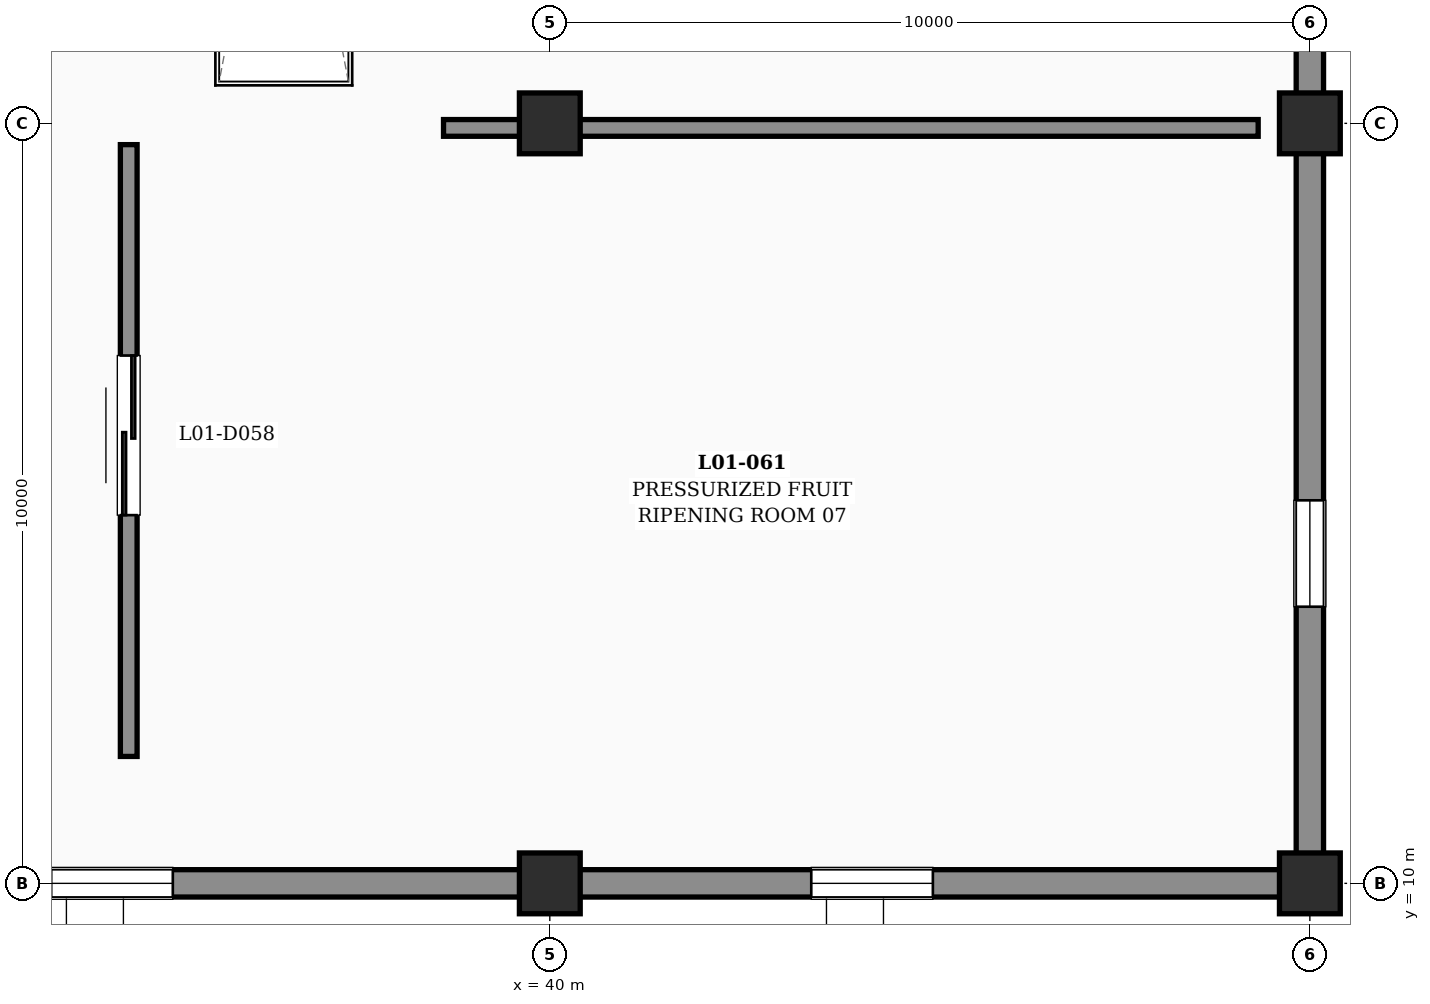
"""IFC4 building model, lengths in metres.
Left out: names, types, materials, properties, quantities, classifications, styles, units other than length and angle.
Written with IfcOpenShell. Run it as: python <this file> out.ifc"""

import sys

from ifc_helpers import new_model, si_unit, direction, frame, frame_2d, origin, origin_2d, place, context, subcontext, project, spatial, rectangle, extrude, element, fill, save


model = new_model("IFC4")
c1 = context("Model", 3, precision=1e-05, world=origin(), true_north=direction((0.0, 1.0)))
c2 = subcontext(c1, "Body", "Model", "MODEL_VIEW")
j1 = project(units=[si_unit("LENGTHUNIT", "METRE"), si_unit("PLANEANGLEUNIT", "RADIAN")], contexts=[c1])
p1 = place(None, origin())
s1 = spatial("IfcSite", under=j1, at=p1, CompositionType="ELEMENT")
p2 = place(p1, origin())
s2 = spatial("IfcBuilding", under=s1, at=p2, CompositionType="ELEMENT")
p3 = place(p2, frame((0.0, 0.0, 6.0)))
s3 = spatial("IfcBuildingStorey", under=s2, at=p3, CompositionType="ELEMENT", Elevation=6.0)
for number, where, z_axis, x_axis in (
    (1, (40.0, 10.0, 0.0), (0.0, 0.0, 1.0), (1.0, 0.0, 0.0)),
    (2, (40.0, 20.0, 0.0), (0.0, 0.0, 1.0), (1.0, 0.0, 0.0)),
    (3, (50.0, 10.0, 0.0), (0.0, 0.0, 1.0), (1.0, 0.0, 0.0)),
    (4, (50.0, 20.0, 0.0), (0.0, 0.0, 1.0), (1.0, 0.0, 0.0)),
):
    element("IfcColumn", number, at=place(p3, frame(where, z_axis=z_axis, x_axis=x_axis)), inside=s3, PredefinedType="COLUMN", context=c2, shape_type="SweptSolid", body=[
        extrude(rectangle(XDim=0.8, YDim=0.8, at=origin_2d()), origin(), (0.0, 0.0, 1.0), 4.8),
    ])
p4 = place(p3, frame((50.0, 10.24, 0.0), z_axis=(0.0, 0.0, 1.0), x_axis=(0.0, 1.0, 0.0)))
e5 = element("IfcWall", 5, at=p4, inside=s3, PredefinedType="SOLIDWALL", context=c2, shape_type="SweptSolid", body=[
    extrude(rectangle(XDim=9.52, YDim=0.36, at=frame_2d((4.76, 0.0))), origin(), (0.0, 0.0, 1.0), 3.61),
])
p5 = place(p4, frame((3.4, 0.0, 1.2)))
e6 = element("IfcOpeningElement", 6, at=p5, cuts=e5, PredefinedType="OPENING", context=c2, shape_type="SweptSolid", body=[
    extrude(rectangle(XDim=1.4, YDim=1.35, at=frame_2d((0.7, 0.675))), frame((0.0, 0.19, 0.0), z_axis=(0.0, -1.0, 0.0), x_axis=(1.0, 0.0, 0.0)), (0.0, 0.0, 1.0), 0.38),
])
p6 = place(p3, frame((50.0, 20.24, 0.0), z_axis=(0.0, 0.0, 1.0), x_axis=(0.0, 1.0, 0.0)))
e7 = element("IfcWall", 7, at=p6, inside=s3, PredefinedType="SOLIDWALL", context=c2, shape_type="SweptSolid", body=[
    extrude(rectangle(XDim=9.52, YDim=0.36, at=frame_2d((4.76, 0.0))), origin(), (0.0, 0.0, 1.0), 3.61),
])
p7 = place(p6, frame((3.4, 0.0, 1.2)))
e8 = element("IfcOpeningElement", 8, at=p7, cuts=e7, PredefinedType="OPENING", context=c2, shape_type="SweptSolid", body=[
    extrude(rectangle(XDim=1.4, YDim=1.35, at=frame_2d((0.7, 0.675))), frame((0.0, 0.19, 0.0), z_axis=(0.0, -1.0, 0.0), x_axis=(1.0, 0.0, 0.0)), (0.0, 0.0, 1.0), 0.38),
])
p8 = place(p3, frame((30.24, 10.0, 0.0), z_axis=(0.0, 0.0, 1.0), x_axis=(1.0, 0.0, 0.0)))
e9 = element("IfcWall", 9, at=p8, inside=s3, PredefinedType="SOLIDWALL", context=c2, shape_type="SweptSolid", body=[
    extrude(rectangle(XDim=9.52, YDim=0.36, at=frame_2d((4.76, 0.0))), origin(), (0.0, 0.0, 1.0), 3.51),
])
p9 = place(p8, frame((3.2, 0.0, 1.15)))
e10 = element("IfcOpeningElement", 10, at=p9, cuts=e9, PredefinedType="OPENING", context=c2, shape_type="SweptSolid", body=[
    extrude(rectangle(XDim=1.6, YDim=1.5, at=frame_2d((0.8, 0.75))), frame((0.0, 0.19, 0.0), z_axis=(0.0, -1.0, 0.0), x_axis=(1.0, 0.0, 0.0)), (0.0, 0.0, 1.0), 0.38),
])
p10 = place(p3, frame((40.24, 10.0, 0.0), z_axis=(0.0, 0.0, 1.0), x_axis=(1.0, 0.0, 0.0)))
e11 = element("IfcWall", 11, at=p10, inside=s3, PredefinedType="SOLIDWALL", context=c2, shape_type="SweptSolid", body=[
    extrude(rectangle(XDim=9.52, YDim=0.36, at=frame_2d((4.76, 0.0))), origin(), (0.0, 0.0, 1.0), 3.51),
])
p11 = place(p10, frame((3.2, 0.0, 1.15)))
e12 = element("IfcOpeningElement", 12, at=p11, cuts=e11, PredefinedType="OPENING", context=c2, shape_type="SweptSolid", body=[
    extrude(rectangle(XDim=1.6, YDim=1.5, at=frame_2d((0.8, 0.75))), frame((0.0, 0.19, 0.0), z_axis=(0.0, -1.0, 0.0), x_axis=(1.0, 0.0, 0.0)), (0.0, 0.0, 1.0), 0.38),
])
p12 = place(p3, frame((34.46, 11.67, 0.0), z_axis=(0.0, 0.0, 1.0), x_axis=(0.0, 1.0, 0.0)))
e13 = element("IfcWall", 13, at=p12, inside=s3, PredefinedType="PARTITIONING", context=c2, shape_type="SweptSolid", body=[
    extrude(rectangle(XDim=8.05, YDim=0.22, at=frame_2d((4.025, 0.0))), origin(), (0.0, 0.0, 1.0), 4.46),
])
p13 = place(p12, frame((3.175, 0.0, 0.0)))
e14 = element("IfcOpeningElement", 14, at=p13, cuts=e13, PredefinedType="OPENING", context=c2, shape_type="SweptSolid", body=[
    extrude(rectangle(XDim=2.1, YDim=2.4, at=frame_2d((1.05, 1.2))), frame((0.0, 0.12, 0.0), z_axis=(0.0, -1.0, 0.0), x_axis=(1.0, 0.0, 0.0)), (0.0, 0.0, 1.0), 0.24),
])
p14 = place(p3, frame((38.602, 19.94, 0.0), z_axis=(0.0, 0.0, 1.0), x_axis=(1.0, 0.0, 0.0)))
e15 = element("IfcWall", 15, at=p14, inside=s3, PredefinedType="PARTITIONING", context=c2, shape_type="SweptSolid", body=[
    extrude(rectangle(XDim=10.718, YDim=0.22, at=frame_2d((5.359, 0.0))), origin(), (0.0, 0.0, 1.0), 3.51),
])
p15 = place(p5, origin())
e16 = element("IfcWindow", 16, at=p15, inside=s3, PartitioningType="SINGLE_PANEL", PredefinedType="WINDOW", context=c2, shape_type="SweptSolid", body=[
    extrude(rectangle(XDim=1.4, YDim=1.35, at=frame_2d((0.7, 0.675))), frame((0.0, 0.03, 0.0), z_axis=(0.0, -1.0, 0.0), x_axis=(1.0, 0.0, 0.0)), (0.0, 0.0, 1.0), 0.06),
])
fill(e6, e16)
p16 = place(p9, origin())
e17 = element("IfcWindow", 17, at=p16, inside=s3, PartitioningType="SINGLE_PANEL", PredefinedType="WINDOW", context=c2, shape_type="SweptSolid", body=[
    extrude(rectangle(XDim=1.6, YDim=1.5, at=frame_2d((0.8, 0.75))), frame((0.0, 0.03, 0.0), z_axis=(0.0, -1.0, 0.0), x_axis=(1.0, 0.0, 0.0)), (0.0, 0.0, 1.0), 0.06),
])
fill(e10, e17)
p17 = place(p11, origin())
e18 = element("IfcWindow", 18, at=p17, inside=s3, PartitioningType="SINGLE_PANEL", PredefinedType="WINDOW", context=c2, shape_type="SweptSolid", body=[
    extrude(rectangle(XDim=1.6, YDim=1.5, at=frame_2d((0.8, 0.75))), frame((0.0, 0.03, 0.0), z_axis=(0.0, -1.0, 0.0), x_axis=(1.0, 0.0, 0.0)), (0.0, 0.0, 1.0), 0.06),
])
fill(e12, e18)
p18 = place(p13, origin())
e19 = element("IfcDoor", 19, at=p18, inside=s3, OperationType="DOUBLE_DOOR_SLIDING", PredefinedType="DOOR", context=c2, shape_type="SweptSolid", body=[
    extrude(rectangle(XDim=2.1, YDim=2.4, at=frame_2d((1.05, 1.2))), frame((0.0, 0.025, 0.0), z_axis=(0.0, -1.0, 0.0), x_axis=(1.0, 0.0, 0.0)), (0.0, 0.0, 1.0), 0.05),
])
fill(e14, e19)
save(model, sys.argv[1])
